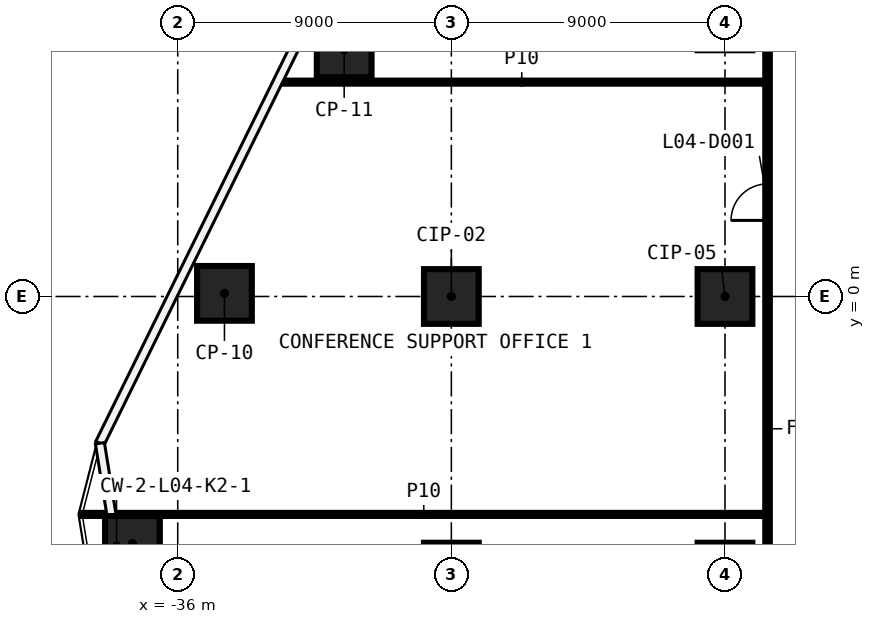
"""IFC4 building model, lengths in metres.
Left out: names, types, materials, properties, quantities, classifications, styles, units other than length and angle.
Written with IfcOpenShell. Run it as: python <this file> out.ifc"""

import sys

from ifc_helpers import new_model, si_unit, direction, frame, frame_2d, origin, origin_2d, place, context, subcontext, project, spatial, rectangle, extrude, element, fill, save


model = new_model("IFC4")
c1 = context("Model", 3, precision=1e-05, world=origin(), true_north=direction((0.0, 1.0)))
c2 = subcontext(c1, "Body", "Model", "MODEL_VIEW")
j1 = project(units=[si_unit("LENGTHUNIT", "METRE"), si_unit("PLANEANGLEUNIT", "RADIAN")], contexts=[c1])
p1 = place(None, origin())
s1 = spatial("IfcSite", under=j1, at=p1, CompositionType="ELEMENT")
p2 = place(p1, origin())
s2 = spatial("IfcBuilding", under=s1, at=p2, CompositionType="ELEMENT")
p3 = place(p2, frame((0.0, 0.0, 33.0)))
s3 = spatial("IfcBuildingStorey", under=s2, at=p3, CompositionType="ELEMENT", Elevation=33.0)
for number, where, z_axis, x_axis in (
    (1, (-37.489, -8.123, 0.0), (0.0, 0.0, 1.0), (1.0, 0.0, 0.0)),
    (2, (-34.463, 0.103, 0.0), (0.0, 0.0, 1.0), (1.0, 0.0, 0.0)),
    (3, (-30.525, 8.111, 0.0), (0.0, 0.0, 1.0), (1.0, 0.0, 0.0)),
    (4, (-27.0, -9.0, 0.0), (0.0, 0.0, 1.0), (1.0, 0.0, 0.0)),
    (5, (-27.0, 0.0, 0.0), (0.0, 0.0, 1.0), (1.0, 0.0, 0.0)),
    (6, (-18.0, -9.0, 0.0), (0.0, 0.0, 1.0), (1.0, 0.0, 0.0)),
    (7, (-18.0, 0.0, 0.0), (0.0, 0.0, 1.0), (1.0, 0.0, 0.0)),
):
    element("IfcColumn", number, at=place(p3, frame(where, z_axis=z_axis, x_axis=x_axis)), inside=s3, PredefinedType="COLUMN", context=c2, shape_type="SweptSolid", body=[
        extrude(rectangle(XDim=1.8, YDim=1.8, at=origin_2d()), origin(), (0.0, 0.0, 1.0), 4.6),
    ])
p4 = place(p3, frame((-39.14, -7.168, 0.0), z_axis=(0.0, 0.0, 1.0), x_axis=(1.0, 0.0, 0.0)))
e8 = element("IfcWall", 8, at=p4, inside=s3, PredefinedType="PARTITIONING", context=c2, shape_type="SweptSolid", body=[
    extrude(rectangle(XDim=22.465, YDim=0.1, at=frame_2d((11.232, 0.0))), origin(), (0.0, 0.0, 1.0), 4.6),
])
p5 = place(p3, frame((-32.695, 7.051, 0.0), z_axis=(0.0, 0.0, 1.0), x_axis=(1.0, 0.0, 0.0)))
e9 = element("IfcWall", 9, at=p5, inside=s3, PredefinedType="PARTITIONING", context=c2, shape_type="SweptSolid", body=[
    extrude(rectangle(XDim=16.02, YDim=0.1, at=frame_2d((8.01, 0.0))), origin(), (0.0, 0.0, 1.0), 4.6),
])
p6 = place(p3, frame((-16.6, -13.525, 0.0), z_axis=(0.0, 0.0, 1.0), x_axis=(0.0, 1.0, 0.0)))
e10 = element("IfcWall", 10, at=p6, inside=s3, PredefinedType="PARTITIONING", context=c2, shape_type="SweptSolid", body=[
    extrude(rectangle(XDim=27.05, YDim=0.15, at=frame_2d((13.525, 0.0))), origin(), (0.0, 0.0, 1.0), 4.6),
])
p7 = place(p6, frame((16.028, 0.0, 0.0)))
e11 = element("IfcOpeningElement", 11, at=p7, cuts=e10, PredefinedType="OPENING", context=c2, shape_type="SweptSolid", body=[
    extrude(rectangle(XDim=1.2, YDim=2.1, at=frame_2d((0.6, 1.05))), frame((0.0, 0.085, 0.0), z_axis=(0.0, -1.0, 0.0), x_axis=(1.0, 0.0, 0.0)), (0.0, 0.0, 1.0), 0.17),
])
p8 = place(p6, frame((1.121, 0.0, 0.0)))
e12 = element("IfcOpeningElement", 12, at=p8, cuts=e10, PredefinedType="OPENING", context=c2, shape_type="SweptSolid", body=[
    extrude(rectangle(XDim=1.2, YDim=2.1, at=frame_2d((0.6, 1.05))), frame((0.0, 0.085, 0.0), z_axis=(0.0, -1.0, 0.0), x_axis=(1.0, 0.0, 0.0)), (0.0, 0.0, 1.0), 0.17),
])
p9 = place(p6, frame((24.705, 0.0, 0.0)))
e13 = element("IfcOpeningElement", 13, at=p9, cuts=e10, PredefinedType="OPENING", context=c2, shape_type="SweptSolid", body=[
    extrude(rectangle(XDim=1.2, YDim=2.1, at=frame_2d((0.6, 1.05))), frame((0.0, 0.085, 0.0), z_axis=(0.0, -1.0, 0.0), x_axis=(1.0, 0.0, 0.0)), (0.0, 0.0, 1.0), 0.17),
])
p10 = place(p7, origin())
e14 = element("IfcDoor", 14, at=p10, inside=s3, OperationType="SINGLE_SWING_RIGHT", PredefinedType="DOOR", context=c2, shape_type="SweptSolid", body=[
    extrude(rectangle(XDim=1.2, YDim=2.1, at=frame_2d((0.6, 1.05))), frame((0.0, 0.025, 0.0), z_axis=(0.0, -1.0, 0.0), x_axis=(1.0, 0.0, 0.0)), (0.0, 0.0, 1.0), 0.05),
])
fill(e11, e14)
save(model, sys.argv[1])
